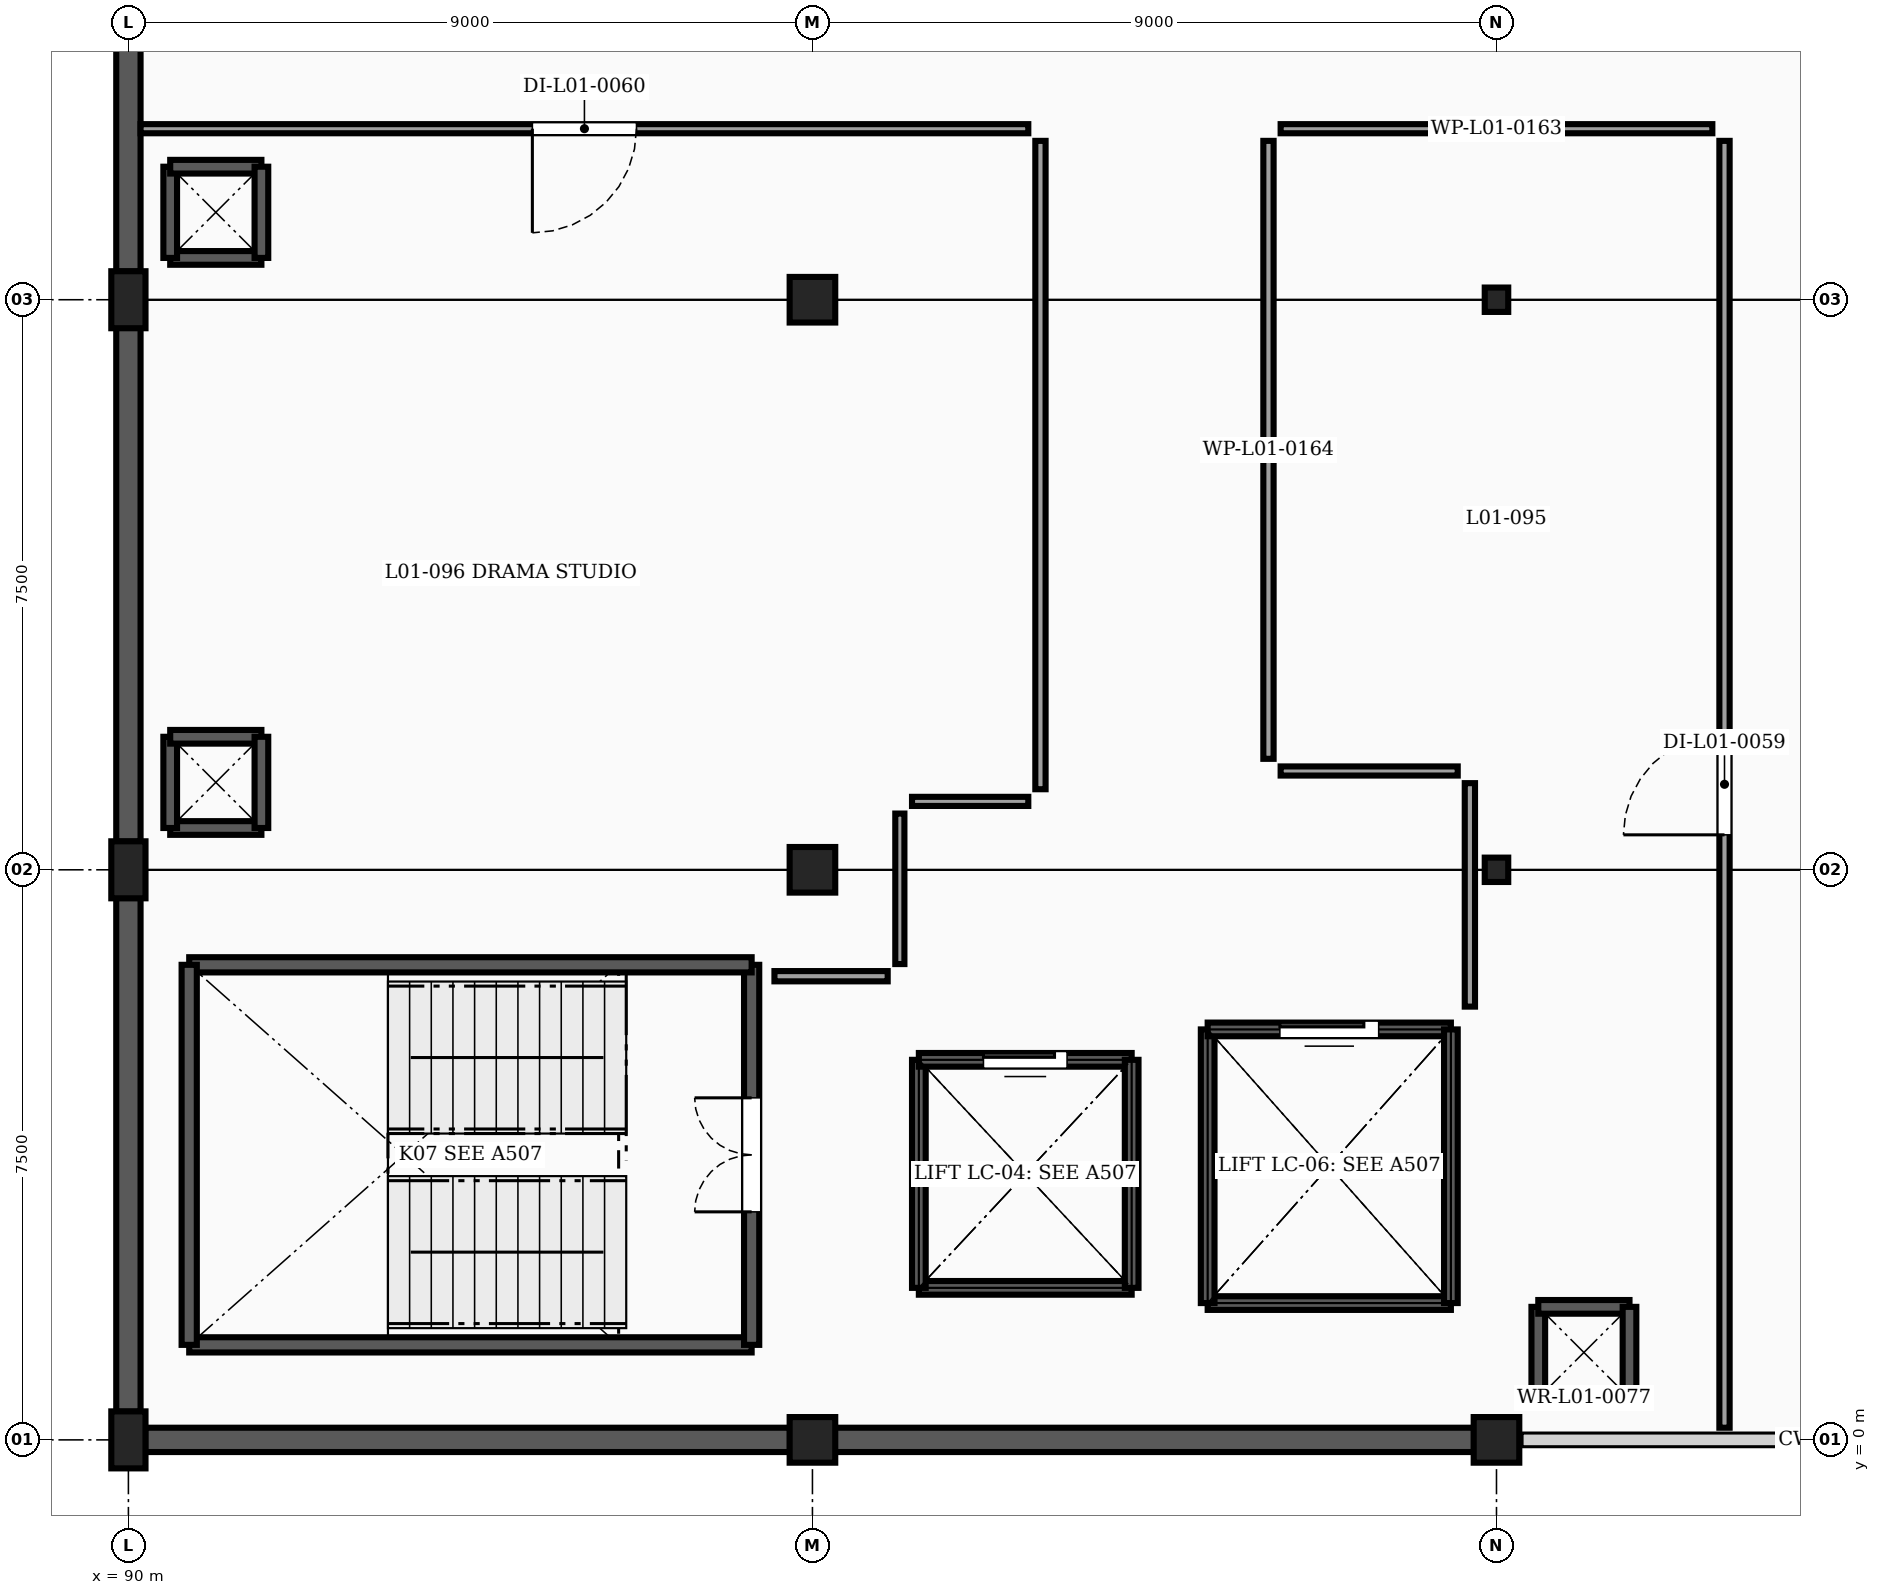
"""IFC4 building model, lengths in metres.
Left out: names, types, materials, properties, quantities, classifications, styles, units other than length and angle.
Written with IfcOpenShell. Run it as: python <this file> out.ifc"""

import sys

from ifc_helpers import new_model, si_unit, direction, frame, frame_2d, origin, origin_2d, place, context, subcontext, project, spatial, rectangle, i_section, extrude, element, fill, save


model = new_model("IFC4")
c1 = context("Model", 3, precision=1e-05, world=origin(), true_north=direction((0.0, 1.0)))
c2 = subcontext(c1, "Body", "Model", "MODEL_VIEW")
j1 = project(units=[si_unit("LENGTHUNIT", "METRE"), si_unit("PLANEANGLEUNIT", "RADIAN")], contexts=[c1])
p1 = place(None, origin())
s1 = spatial("IfcSite", under=j1, at=p1, CompositionType="ELEMENT")
p2 = place(p1, origin())
s2 = spatial("IfcBuilding", under=s1, at=p2, CompositionType="ELEMENT")
p3 = place(p2, frame((0.0, 0.0, 4.5)))
s3 = spatial("IfcBuildingStorey", under=s2, at=p3, CompositionType="ELEMENT", Elevation=4.5)
p4 = place(p3, frame((90.0, 0.0, 0.0), z_axis=(0.0, 0.0, 1.0), x_axis=(1.0, 0.0, 0.0)))
e1 = element("IfcColumn", 1, at=p4, inside=s3, PredefinedType="COLUMN", context=c2, shape_type="SweptSolid", body=[
    extrude(rectangle(XDim=0.45, YDim=0.75, at=origin_2d()), origin(), (0.0, 0.0, 1.0), 4.0),
])
for number, where, z_axis, x_axis in (
    (2, (99.0, 0.0, 0.0), (0.0, 0.0, 1.0), (1.0, 0.0, 0.0)),
    (3, (108.0, 0.0, 0.0), (0.0, 0.0, 1.0), (1.0, 0.0, 0.0)),
):
    element("IfcColumn", number, at=place(p3, frame(where, z_axis=z_axis, x_axis=x_axis)), inside=s3, PredefinedType="COLUMN", context=c2, shape_type="SweptSolid", body=[
        extrude(rectangle(XDim=0.6, YDim=0.6, at=origin_2d()), origin(), (0.0, 0.0, 1.0), 4.0),
    ])
p5 = place(p3, frame((90.0, 7.5, 0.0), z_axis=(0.0, 0.0, 1.0), x_axis=(1.0, 0.0, 0.0)))
e4 = element("IfcColumn", 4, at=p5, inside=s3, PredefinedType="COLUMN", context=c2, shape_type="SweptSolid", body=[
    extrude(rectangle(XDim=0.45, YDim=0.75, at=origin_2d()), origin(), (0.0, 0.0, 1.0), 4.0),
])
p6 = place(p3, frame((99.0, 7.5, 0.0), z_axis=(0.0, 0.0, 1.0), x_axis=(1.0, 0.0, 0.0)))
e5 = element("IfcColumn", 5, at=p6, inside=s3, PredefinedType="COLUMN", context=c2, shape_type="SweptSolid", body=[
    extrude(rectangle(XDim=0.6, YDim=0.6, at=origin_2d()), origin(), (0.0, 0.0, 1.0), 4.0),
])
p7 = place(p3, frame((108.0, 7.5, 0.0), z_axis=(0.0, 0.0, 1.0), x_axis=(1.0, 0.0, 0.0)))
e6 = element("IfcColumn", 6, at=p7, inside=s3, PredefinedType="COLUMN", context=c2, shape_type="SweptSolid", body=[
    extrude(i_section(OverallWidth=0.309, OverallDepth=0.321, WebThickness=0.014, FlangeThickness=0.022, FilletRadius=0.017, at=origin_2d()), origin(), (0.0, 0.0, 1.0), 4.0),
])
p8 = place(p3, frame((90.0, 15.0, 0.0), z_axis=(0.0, 0.0, 1.0), x_axis=(1.0, 0.0, 0.0)))
e7 = element("IfcColumn", 7, at=p8, inside=s3, PredefinedType="COLUMN", context=c2, shape_type="SweptSolid", body=[
    extrude(rectangle(XDim=0.45, YDim=0.75, at=origin_2d()), origin(), (0.0, 0.0, 1.0), 4.0),
])
p9 = place(p3, frame((99.0, 15.0, 0.0), z_axis=(0.0, 0.0, 1.0), x_axis=(1.0, 0.0, 0.0)))
e8 = element("IfcColumn", 8, at=p9, inside=s3, PredefinedType="COLUMN", context=c2, shape_type="SweptSolid", body=[
    extrude(rectangle(XDim=0.6, YDim=0.6, at=origin_2d()), origin(), (0.0, 0.0, 1.0), 4.0),
])
p10 = place(p3, frame((108.0, 15.0, 0.0), z_axis=(0.0, 0.0, 1.0), x_axis=(1.0, 0.0, 0.0)))
e9 = element("IfcColumn", 9, at=p10, inside=s3, PredefinedType="COLUMN", context=c2, shape_type="SweptSolid", body=[
    extrude(i_section(OverallWidth=0.309, OverallDepth=0.321, WebThickness=0.014, FlangeThickness=0.022, FilletRadius=0.017, at=origin_2d()), origin(), (0.0, 0.0, 1.0), 4.0),
])
p11 = place(p3, frame((107.704, 0.0, 0.0), z_axis=(0.0, 0.0, 1.0), x_axis=(-1.0, 0.0, 0.0)))
e10 = element("IfcWall", 10, at=p11, inside=s3, PredefinedType="SOLIDWALL", context=c2, shape_type="SweptSolid", body=[
    extrude(rectangle(XDim=8.408, YDim=0.32, at=frame_2d((4.204, 0.0))), origin(), (0.0, 0.0, 1.0), 3.41),
])
p12 = place(p3, frame((98.704, 0.0, 0.0), z_axis=(0.0, 0.0, 1.0), x_axis=(-1.0, 0.0, 0.0)))
e11 = element("IfcWall", 11, at=p12, inside=s3, PredefinedType="SOLIDWALL", context=c2, shape_type="SweptSolid", body=[
    extrude(rectangle(XDim=8.483, YDim=0.32, at=frame_2d((4.242, 0.0))), origin(), (0.0, 0.0, 1.0), 3.41),
])
for number, where, z_axis, x_axis in (
    (12, (90.0, 0.371, 0.0), (0.0, 0.0, 1.0), (0.0, 1.0, 0.0)),
    (13, (90.0, 7.871, 0.0), (0.0, 0.0, 1.0), (0.0, 1.0, 0.0)),
    (14, (90.0, 15.371, 0.0), (0.0, 0.0, 1.0), (0.0, 1.0, 0.0)),
):
    element("IfcWall", number, at=place(p3, frame(where, z_axis=z_axis, x_axis=x_axis)), inside=s3, PredefinedType="SOLIDWALL", context=c2, shape_type="SweptSolid", body=[
        extrude(rectangle(XDim=6.758, YDim=0.32, at=frame_2d((3.379, 0.0))), origin(), (0.0, 0.0, 1.0), 2.792),
    ])
for number, where, z_axis, x_axis in (
    (15, (109.75, 0.55, 0.0), (0.0, 0.0, 1.0), (-1.0, 0.0, 0.0)),
    (16, (108.55, 0.55, 0.0), (0.0, 0.0, 1.0), (0.0, 1.0, 0.0)),
    (17, (108.55, 1.75, 0.0), (0.0, 0.0, 1.0), (1.0, 0.0, 0.0)),
    (18, (109.75, 1.75, 0.0), (0.0, 0.0, 1.0), (0.0, -1.0, 0.0)),
    (19, (91.75, 8.05, 0.0), (0.0, 0.0, 1.0), (-1.0, 0.0, 0.0)),
    (20, (90.55, 8.05, 0.0), (0.0, 0.0, 1.0), (0.0, 1.0, 0.0)),
    (21, (90.55, 9.25, 0.0), (0.0, 0.0, 1.0), (1.0, 0.0, 0.0)),
    (22, (91.75, 9.25, 0.0), (0.0, 0.0, 1.0), (0.0, -1.0, 0.0)),
    (23, (91.75, 15.55, 0.0), (0.0, 0.0, 1.0), (-1.0, 0.0, 0.0)),
    (24, (90.55, 15.55, 0.0), (0.0, 0.0, 1.0), (0.0, 1.0, 0.0)),
    (25, (90.55, 16.75, 0.0), (0.0, 0.0, 1.0), (1.0, 0.0, 0.0)),
    (26, (91.75, 16.75, 0.0), (0.0, 0.0, 1.0), (0.0, -1.0, 0.0)),
):
    element("IfcWall", number, at=place(p3, frame(where, z_axis=z_axis, x_axis=x_axis)), inside=s3, PredefinedType="SHEAR", context=c2, shape_type="SweptSolid", body=[
        extrude(rectangle(XDim=1.2, YDim=0.18, at=frame_2d((0.6, 0.0))), origin(), (0.0, 0.0, 1.0), 3.77),
    ])
p13 = place(p3, frame((90.8, 1.25, 0.0), z_axis=(0.0, 0.0, 1.0), x_axis=(1.0, 0.0, 0.0)))
e27 = element("IfcWall", 27, at=p13, inside=s3, PredefinedType="SHEAR", context=c2, shape_type="SweptSolid", body=[
    extrude(rectangle(XDim=7.4, YDim=0.2, at=frame_2d((3.7, 0.0))), origin(), (0.0, 0.0, 1.0), 3.77),
])
p14 = place(p3, frame((98.2, 1.25, 0.0), z_axis=(0.0, 0.0, 1.0), x_axis=(0.0, 1.0, 0.0)))
e28 = element("IfcWall", 28, at=p14, inside=s3, PredefinedType="SHEAR", context=c2, shape_type="SweptSolid", body=[
    extrude(rectangle(XDim=5.0, YDim=0.2, at=frame_2d((2.5, 0.0))), origin(), (0.0, 0.0, 1.0), 3.77),
])
p15 = place(p14, frame((1.75, 0.0, 0.0)))
e29 = element("IfcOpeningElement", 29, at=p15, cuts=e28, PredefinedType="OPENING", context=c2, shape_type="SweptSolid", body=[
    extrude(rectangle(XDim=1.5, YDim=2.15, at=frame_2d((0.75, 1.075))), frame((0.0, 0.11, 0.0), z_axis=(0.0, -1.0, 0.0), x_axis=(1.0, 0.0, 0.0)), (0.0, 0.0, 1.0), 0.22),
])
p16 = place(p3, frame((98.2, 6.25, 0.0), z_axis=(0.0, 0.0, 1.0), x_axis=(-1.0, 0.0, 0.0)))
e30 = element("IfcWall", 30, at=p16, inside=s3, PredefinedType="SHEAR", context=c2, shape_type="SweptSolid", body=[
    extrude(rectangle(XDim=7.4, YDim=0.2, at=frame_2d((3.7, 0.0))), origin(), (0.0, 0.0, 1.0), 3.77),
])
p17 = place(p3, frame((90.8, 6.25, 0.0), z_axis=(0.0, 0.0, 1.0), x_axis=(0.0, -1.0, 0.0)))
e31 = element("IfcWall", 31, at=p17, inside=s3, PredefinedType="SHEAR", context=c2, shape_type="SweptSolid", body=[
    extrude(rectangle(XDim=5.0, YDim=0.2, at=frame_2d((2.5, 0.0))), origin(), (0.0, 0.0, 1.0), 3.77),
])
p18 = place(p3, frame((103.2, 2.0, 0.0), z_axis=(0.0, 0.0, 1.0), x_axis=(-1.0, 0.0, 0.0)))
e32 = element("IfcWall", 32, at=p18, inside=s3, PredefinedType="SHEAR", context=c2, shape_type="SweptSolid", body=[
    extrude(rectangle(XDim=2.8, YDim=0.18, at=frame_2d((1.4, 0.0))), origin(), (0.0, 0.0, 1.0), 3.77),
])
p19 = place(p3, frame((100.4, 2.0, 0.0), z_axis=(0.0, 0.0, 1.0), x_axis=(0.0, 1.0, 0.0)))
e33 = element("IfcWall", 33, at=p19, inside=s3, PredefinedType="SHEAR", context=c2, shape_type="SweptSolid", body=[
    extrude(rectangle(XDim=3.0, YDim=0.18, at=frame_2d((1.5, 0.0))), origin(), (0.0, 0.0, 1.0), 3.77),
])
p20 = place(p3, frame((100.4, 5.0, 0.0), z_axis=(0.0, 0.0, 1.0), x_axis=(1.0, 0.0, 0.0)))
e34 = element("IfcWall", 34, at=p20, inside=s3, PredefinedType="SHEAR", context=c2, shape_type="SweptSolid", body=[
    extrude(rectangle(XDim=2.8, YDim=0.18, at=frame_2d((1.4, 0.0))), origin(), (0.0, 0.0, 1.0), 3.77),
])
p21 = place(p20, frame((0.85, 0.0, 0.0)))
e35 = element("IfcOpeningElement", 35, at=p21, cuts=e34, PredefinedType="OPENING", context=c2, shape_type="SweptSolid", body=[
    extrude(rectangle(XDim=1.1, YDim=2.15, at=frame_2d((0.55, 1.075))), frame((0.0, 0.1, 0.0), z_axis=(0.0, -1.0, 0.0), x_axis=(1.0, 0.0, 0.0)), (0.0, 0.0, 1.0), 0.2),
])
p22 = place(p3, frame((103.2, 5.0, 0.0), z_axis=(0.0, 0.0, 1.0), x_axis=(0.0, -1.0, 0.0)))
e36 = element("IfcWall", 36, at=p22, inside=s3, PredefinedType="SHEAR", context=c2, shape_type="SweptSolid", body=[
    extrude(rectangle(XDim=3.0, YDim=0.18, at=frame_2d((1.5, 0.0))), origin(), (0.0, 0.0, 1.0), 3.77),
])
p23 = place(p3, frame((107.4, 1.8, 0.0), z_axis=(0.0, 0.0, 1.0), x_axis=(-1.0, 0.0, 0.0)))
e37 = element("IfcWall", 37, at=p23, inside=s3, PredefinedType="SHEAR", context=c2, shape_type="SweptSolid", body=[
    extrude(rectangle(XDim=3.2, YDim=0.18, at=frame_2d((1.6, 0.0))), origin(), (0.0, 0.0, 1.0), 3.77),
])
p24 = place(p3, frame((104.2, 1.8, 0.0), z_axis=(0.0, 0.0, 1.0), x_axis=(0.0, 1.0, 0.0)))
e38 = element("IfcWall", 38, at=p24, inside=s3, PredefinedType="SHEAR", context=c2, shape_type="SweptSolid", body=[
    extrude(rectangle(XDim=3.6, YDim=0.18, at=frame_2d((1.8, 0.0))), origin(), (0.0, 0.0, 1.0), 3.77),
])
p25 = place(p3, frame((104.2, 5.4, 0.0), z_axis=(0.0, 0.0, 1.0), x_axis=(1.0, 0.0, 0.0)))
e39 = element("IfcWall", 39, at=p25, inside=s3, PredefinedType="SHEAR", context=c2, shape_type="SweptSolid", body=[
    extrude(rectangle(XDim=3.2, YDim=0.18, at=frame_2d((1.6, 0.0))), origin(), (0.0, 0.0, 1.0), 3.77),
])
p26 = place(p25, frame((0.95, 0.0, 0.0)))
e40 = element("IfcOpeningElement", 40, at=p26, cuts=e39, PredefinedType="OPENING", context=c2, shape_type="SweptSolid", body=[
    extrude(rectangle(XDim=1.3, YDim=2.2, at=frame_2d((0.65, 1.1))), frame((0.0, 0.1, 0.0), z_axis=(0.0, -1.0, 0.0), x_axis=(1.0, 0.0, 0.0)), (0.0, 0.0, 1.0), 0.2),
])
p27 = place(p3, frame((107.4, 5.4, 0.0), z_axis=(0.0, 0.0, 1.0), x_axis=(0.0, -1.0, 0.0)))
e41 = element("IfcWall", 41, at=p27, inside=s3, PredefinedType="SHEAR", context=c2, shape_type="SweptSolid", body=[
    extrude(rectangle(XDim=3.6, YDim=0.18, at=frame_2d((1.8, 0.0))), origin(), (0.0, 0.0, 1.0), 3.77),
])
p28 = place(p3, frame((111.0, 0.16, 0.0), z_axis=(0.0, 0.0, 1.0), x_axis=(0.0, 1.0, 0.0)))
e42 = element("IfcWall", 42, at=p28, inside=s3, PredefinedType="PARTITIONING", context=c2, shape_type="SweptSolid", body=[
    extrude(rectangle(XDim=16.93, YDim=0.135, at=frame_2d((8.465, 0.0))), origin(), (0.0, 0.0, 1.0), 3.362),
])
p29 = place(p28, frame((7.8, 0.0, 0.0)))
e43 = element("IfcOpeningElement", 43, at=p29, cuts=e42, PredefinedType="OPENING", context=c2, shape_type="SweptSolid", body=[
    extrude(rectangle(XDim=1.33, YDim=2.18, at=frame_2d((0.665, 1.09))), frame((0.0, 0.077, 0.0), z_axis=(0.0, -1.0, 0.0), x_axis=(1.0, 0.0, 0.0)), (0.0, 0.0, 1.0), 0.155),
])
p30 = place(p3, frame((110.84, 17.25, 0.0), z_axis=(0.0, 0.0, 1.0), x_axis=(-1.0, 0.0, 0.0)))
e44 = element("IfcWall", 44, at=p30, inside=s3, PredefinedType="PARTITIONING", context=c2, shape_type="SweptSolid", body=[
    extrude(rectangle(XDim=5.68, YDim=0.12, at=frame_2d((2.84, 0.0))), origin(), (0.0, 0.0, 1.0), 3.77),
])
p31 = place(p3, frame((105.0, 17.09, 0.0), z_axis=(0.0, 0.0, 1.0), x_axis=(0.0, -1.0, 0.0)))
e45 = element("IfcWall", 45, at=p31, inside=s3, PredefinedType="PARTITIONING", context=c2, shape_type="SweptSolid", body=[
    extrude(rectangle(XDim=8.13, YDim=0.135, at=frame_2d((4.065, 0.0))), origin(), (0.0, 0.0, 1.0), 3.362),
])
p32 = place(p3, frame((105.16, 8.8, 0.0), z_axis=(0.0, 0.0, 1.0), x_axis=(1.0, 0.0, 0.0)))
e46 = element("IfcWall", 46, at=p32, inside=s3, PredefinedType="PARTITIONING", context=c2, shape_type="SweptSolid", body=[
    extrude(rectangle(XDim=2.33, YDim=0.12, at=frame_2d((1.165, 0.0))), origin(), (0.0, 0.0, 1.0), 3.77),
])
p33 = place(p3, frame((107.65, 8.64, 0.0), z_axis=(0.0, 0.0, 1.0), x_axis=(0.0, -1.0, 0.0)))
e47 = element("IfcWall", 47, at=p33, inside=s3, PredefinedType="PARTITIONING", context=c2, shape_type="SweptSolid", body=[
    extrude(rectangle(XDim=2.94, YDim=0.135, at=frame_2d((1.47, 0.0))), origin(), (0.0, 0.0, 1.0), 3.16),
])
p34 = place(p3, frame((100.31, 8.4, 0.0), z_axis=(0.0, 0.0, 1.0), x_axis=(1.0, 0.0, 0.0)))
e48 = element("IfcWall", 48, at=p34, inside=s3, PredefinedType="PARTITIONING", context=c2, shape_type="SweptSolid", body=[
    extrude(rectangle(XDim=1.53, YDim=0.12, at=frame_2d((0.765, 0.0))), origin(), (0.0, 0.0, 1.0), 3.77),
])
p35 = place(p3, frame((102.0, 8.56, 0.0), z_axis=(0.0, 0.0, 1.0), x_axis=(0.0, 1.0, 0.0)))
e49 = element("IfcWall", 49, at=p35, inside=s3, PredefinedType="PARTITIONING", context=c2, shape_type="SweptSolid", body=[
    extrude(rectangle(XDim=8.53, YDim=0.135, at=frame_2d((4.265, 0.0))), origin(), (0.0, 0.0, 1.0), 3.362),
])
p36 = place(p3, frame((101.84, 17.25, 0.0), z_axis=(0.0, 0.0, 1.0), x_axis=(-1.0, 0.0, 0.0)))
e50 = element("IfcWall", 50, at=p36, inside=s3, PredefinedType="PARTITIONING", context=c2, shape_type="SweptSolid", body=[
    extrude(rectangle(XDim=11.68, YDim=0.12, at=frame_2d((5.84, 0.0))), origin(), (0.0, 0.0, 1.0), 3.77),
])
p37 = place(p36, frame((5.155, 0.0, 0.0)))
e51 = element("IfcOpeningElement", 51, at=p37, cuts=e50, PredefinedType="OPENING", context=c2, shape_type="SweptSolid", body=[
    extrude(rectangle(XDim=1.37, YDim=2.18, at=frame_2d((0.685, 1.09))), frame((0.0, 0.07, 0.0), z_axis=(0.0, -1.0, 0.0), x_axis=(1.0, 0.0, 0.0)), (0.0, 0.0, 1.0), 0.14),
])
p38 = place(p3, frame((98.5, 6.1, 0.0), z_axis=(0.0, 0.0, 1.0), x_axis=(1.0, 0.0, 0.0)))
e52 = element("IfcWall", 52, at=p38, inside=s3, PredefinedType="PARTITIONING", context=c2, shape_type="SweptSolid", body=[
    extrude(rectangle(XDim=1.49, YDim=0.135, at=frame_2d((0.745, 0.0))), origin(), (0.0, 0.0, 1.0), 3.77),
])
p39 = place(p3, frame((100.15, 6.26, 0.0), z_axis=(0.0, 0.0, 1.0), x_axis=(0.0, 1.0, 0.0)))
e53 = element("IfcWall", 53, at=p39, inside=s3, PredefinedType="PARTITIONING", context=c2, shape_type="SweptSolid", body=[
    extrude(rectangle(XDim=1.98, YDim=0.12, at=frame_2d((0.99, 0.0))), origin(), (0.0, 0.0, 1.0), 3.77),
])
p40 = place(p15, origin())
e54 = element("IfcDoor", 54, at=p40, inside=s3, OperationType="DOUBLE_DOOR_SINGLE_SWING", PredefinedType="DOOR", context=c2, shape_type="SweptSolid", body=[
    extrude(rectangle(XDim=1.5, YDim=2.15, at=frame_2d((0.75, 1.075))), frame((0.0, 0.025, 0.0), z_axis=(0.0, -1.0, 0.0), x_axis=(1.0, 0.0, 0.0)), (0.0, 0.0, 1.0), 0.05),
])
fill(e29, e54)
p41 = place(p21, origin())
e55 = element("IfcDoor", 55, at=p41, inside=s3, OperationType="SLIDING_TO_LEFT", PredefinedType="DOOR", context=c2, shape_type="SweptSolid", body=[
    extrude(rectangle(XDim=1.1, YDim=2.15, at=frame_2d((0.55, 1.075))), frame((0.0, 0.025, 0.0), z_axis=(0.0, -1.0, 0.0), x_axis=(1.0, 0.0, 0.0)), (0.0, 0.0, 1.0), 0.05),
])
fill(e35, e55)
p42 = place(p26, origin())
e56 = element("IfcDoor", 56, at=p42, inside=s3, OperationType="SLIDING_TO_LEFT", PredefinedType="DOOR", context=c2, shape_type="SweptSolid", body=[
    extrude(rectangle(XDim=1.3, YDim=2.2, at=frame_2d((0.65, 1.1))), frame((0.0, 0.025, 0.0), z_axis=(0.0, -1.0, 0.0), x_axis=(1.0, 0.0, 0.0)), (0.0, 0.0, 1.0), 0.05),
])
fill(e40, e56)
p43 = place(p29, origin())
e57 = element("IfcDoor", 57, at=p43, inside=s3, OperationType="SINGLE_SWING_LEFT", PredefinedType="DOOR", context=c2, shape_type="SweptSolid", body=[
    extrude(rectangle(XDim=1.33, YDim=2.18, at=frame_2d((0.665, 1.09))), frame((0.0, 0.025, 0.0), z_axis=(0.0, -1.0, 0.0), x_axis=(1.0, 0.0, 0.0)), (0.0, 0.0, 1.0), 0.05),
])
fill(e43, e57)
p44 = place(p37, origin())
e58 = element("IfcDoor", 58, at=p44, inside=s3, OperationType="SINGLE_SWING_RIGHT", PredefinedType="DOOR", context=c2, shape_type="SweptSolid", body=[
    extrude(rectangle(XDim=1.37, YDim=2.18, at=frame_2d((0.685, 1.09))), frame((0.0, 0.025, 0.0), z_axis=(0.0, -1.0, 0.0), x_axis=(1.0, 0.0, 0.0)), (0.0, 0.0, 1.0), 0.05),
])
fill(e51, e58)
save(model, sys.argv[1])
